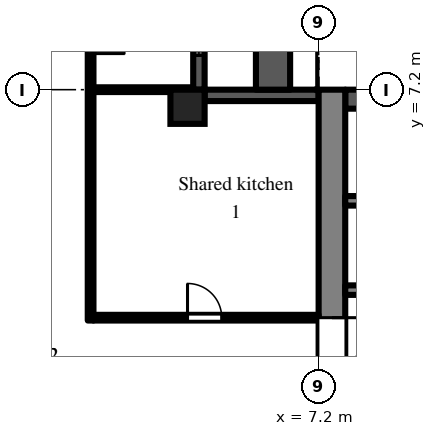
"""IFC4 building model, lengths in metres.
Left out: names, types, materials, properties, quantities, classifications, styles, units other than length and angle.
Written with IfcOpenShell. Run it as: python <this file> out.ifc"""

import sys

from ifc_helpers import new_model, si_unit, direction, frame, frame_2d, origin, origin_2d, place, context, subcontext, project, spatial, rectangle, extrude, element, fill, save


model = new_model("IFC4")
c1 = context("Model", 3, precision=1e-05, world=origin(), true_north=direction((0.0, 1.0)))
c2 = subcontext(c1, "Body", "Model", "MODEL_VIEW")
j1 = project(units=[si_unit("LENGTHUNIT", "METRE"), si_unit("PLANEANGLEUNIT", "RADIAN")], contexts=[c1])
p1 = place(None, origin())
s1 = spatial("IfcSite", under=j1, at=p1, CompositionType="ELEMENT")
p2 = place(p1, origin())
s2 = spatial("IfcBuilding", under=s1, at=p2, CompositionType="ELEMENT")
p3 = place(p2, frame((0.0, 0.0, 69.9)))
s3 = spatial("IfcBuildingStorey", under=s2, at=p3, CompositionType="ELEMENT", Elevation=69.9)
p4 = place(p3, frame((3.75, 6.75, 0.0), z_axis=(0.0, 0.0, 1.0), x_axis=(1.0, 0.0, 0.0)))
e1 = element("IfcColumn", 1, at=p4, inside=s3, PredefinedType="COLUMN", context=c2, shape_type="SweptSolid", body=[
    extrude(rectangle(XDim=0.9, YDim=0.9, at=origin_2d()), origin(), (0.0, 0.0, 1.0), 3.0),
])
p5 = place(p3, frame((7.2, 7.05, 0.0), z_axis=(0.0, 0.0, 1.0), x_axis=(-1.0, 0.0, 0.0)))
e2 = element("IfcWall", 2, at=p5, inside=s3, PredefinedType="SOLIDWALL", context=c2, shape_type="SweptSolid", body=[
    extrude(rectangle(XDim=3.0, YDim=0.3, at=frame_2d((1.5, 0.0))), origin(), (0.0, 0.0, 1.0), 2.1),
])
p6 = place(p3, frame((4.05, 7.2, 0.0), z_axis=(0.0, 0.0, 1.0), x_axis=(0.0, 1.0, 0.0)))
e3 = element("IfcWall", 3, at=p6, inside=s3, PredefinedType="SOLIDWALL", context=c2, shape_type="SweptSolid", body=[
    extrude(rectangle(XDim=7.2, YDim=0.3, at=frame_2d((3.6, 0.0))), origin(), (0.0, 0.0, 1.0), 2.1),
])
p7 = place(p6, frame((3.0, 0.0, 0.0)))
e4 = element("IfcOpeningElement", 4, at=p7, cuts=e3, PredefinedType="OPENING", context=c2, shape_type="SweptSolid", body=[
    extrude(rectangle(XDim=1.2, YDim=2.05, at=frame_2d((0.6, 1.025))), frame((0.0, 0.16, 0.0), z_axis=(0.0, -1.0, 0.0), x_axis=(1.0, 0.0, 0.0)), (0.0, 0.0, 1.0), 0.32),
])
p8 = place(p6, frame((0.9, 0.0, 0.2)))
e5 = element("IfcOpeningElement", 5, at=p8, cuts=e3, PredefinedType="OPENING", context=c2, shape_type="SweptSolid", body=[
    extrude(rectangle(XDim=1.8, YDim=1.85, at=frame_2d((0.9, 0.925))), frame((0.0, 0.16, 0.0), z_axis=(0.0, -1.0, 0.0), x_axis=(1.0, 0.0, 0.0)), (0.0, 0.0, 1.0), 0.32),
])
p9 = place(p6, frame((4.5, 0.0, 0.2)))
e6 = element("IfcOpeningElement", 6, at=p9, cuts=e3, PredefinedType="OPENING", context=c2, shape_type="SweptSolid", body=[
    extrude(rectangle(XDim=1.8, YDim=1.85, at=frame_2d((0.9, 0.925))), frame((0.0, 0.16, 0.0), z_axis=(0.0, -1.0, 0.0), x_axis=(1.0, 0.0, 0.0)), (0.0, 0.0, 1.0), 0.32),
])
p10 = place(p3, frame((6.0, 7.2, 0.0), z_axis=(0.0, 0.0, 1.0), x_axis=(0.0, 1.0, 0.0)))
e7 = element("IfcWall", 7, at=p10, inside=s3, PredefinedType="PARAPET", context=c2, shape_type="SweptSolid", body=[
    extrude(rectangle(XDim=7.2, YDim=0.9, at=frame_2d((3.6, 0.0))), origin(), (0.0, 0.0, 1.0), 0.8),
])
p11 = place(p3, frame((7.55, -7.2, 0.0), z_axis=(0.0, 0.0, 1.0), x_axis=(0.0, 1.0, 0.0)))
e8 = element("IfcWall", 8, at=p11, inside=s3, PredefinedType="SHEAR", context=c2, shape_type="SweptSolid", body=[
    extrude(rectangle(XDim=14.4, YDim=0.7, at=frame_2d((7.2, 0.0))), origin(), (0.0, 0.0, 1.0), 2.575),
])
p12 = place(p11, frame((6.0, 0.0, 0.0)))
e9 = element("IfcOpeningElement", 9, at=p12, cuts=e8, PredefinedType="OPENING", context=c2, shape_type="SweptSolid", body=[
    extrude(rectangle(XDim=2.4, YDim=2.2, at=frame_2d((1.2, 1.1))), frame((0.0, 0.36, 0.0), z_axis=(0.0, -1.0, 0.0), x_axis=(1.0, 0.0, 0.0)), (0.0, 0.0, 1.0), 0.72),
])
p13 = place(p3, frame((7.9, 6.95, 0.0), z_axis=(0.0, 0.0, 1.0), x_axis=(1.0, 0.0, 0.0)))
e10 = element("IfcWall", 10, at=p13, inside=s3, PredefinedType="SHEAR", context=c2, shape_type="SweptSolid", body=[
    extrude(rectangle(XDim=12.95, YDim=0.5, at=frame_2d((6.475, 0.0))), origin(), (0.0, 0.0, 1.0), 2.575),
])
p14 = place(p3, frame((7.9, 1.925, 0.0), z_axis=(0.0, 0.0, 1.0), x_axis=(1.0, 0.0, 0.0)))
e11 = element("IfcWall", 11, at=p14, inside=s3, PredefinedType="SHEAR", context=c2, shape_type="SweptSolid", body=[
    extrude(rectangle(XDim=12.95, YDim=0.25, at=frame_2d((6.475, 0.0))), origin(), (0.0, 0.0, 1.0), 2.575),
])
p15 = place(p14, frame((0.525, 0.0, 0.0)))
e12 = element("IfcOpeningElement", 12, at=p15, cuts=e11, PredefinedType="OPENING", context=c2, shape_type="SweptSolid", body=[
    extrude(rectangle(XDim=0.9, YDim=2.1, at=frame_2d((0.45, 1.05))), frame((0.0, 0.135, 0.0), z_axis=(0.0, -1.0, 0.0), x_axis=(1.0, 0.0, 0.0)), (0.0, 0.0, 1.0), 0.27),
])
p16 = place(p14, frame((2.625, 0.0, 0.0)))
e13 = element("IfcOpeningElement", 13, at=p16, cuts=e11, PredefinedType="OPENING", context=c2, shape_type="SweptSolid", body=[
    extrude(rectangle(XDim=1.1, YDim=2.1, at=frame_2d((0.55, 1.05))), frame((0.0, 0.135, 0.0), z_axis=(0.0, -1.0, 0.0), x_axis=(1.0, 0.0, 0.0)), (0.0, 0.0, 1.0), 0.27),
])
p17 = place(p14, frame((7.125, 0.0, 0.0)))
e14 = element("IfcOpeningElement", 14, at=p17, cuts=e11, PredefinedType="OPENING", context=c2, shape_type="SweptSolid", body=[
    extrude(rectangle(XDim=0.9, YDim=2.1, at=frame_2d((0.45, 1.05))), frame((0.0, 0.135, 0.0), z_axis=(0.0, -1.0, 0.0), x_axis=(1.0, 0.0, 0.0)), (0.0, 0.0, 1.0), 0.27),
])
p18 = place(p3, frame((7.9, 4.275, 0.0), z_axis=(0.0, 0.0, 1.0), x_axis=(1.0, 0.0, 0.0)))
e15 = element("IfcWall", 15, at=p18, inside=s3, PredefinedType="SHEAR", context=c2, shape_type="SweptSolid", body=[
    extrude(rectangle(XDim=1.95, YDim=0.25, at=frame_2d((0.975, 0.0))), origin(), (0.0, 0.0, 1.0), 2.575),
])
p19 = place(p3, frame((1.2, 1.125, 0.0), z_axis=(0.0, 0.0, 1.0), x_axis=(0.0, 1.0, 0.0)))
e16 = element("IfcWall", 16, at=p19, inside=s3, PredefinedType="PARTITIONING", context=c2, shape_type="SweptSolid", body=[
    extrude(rectangle(XDim=16.8, YDim=0.15, at=frame_2d((8.4, 0.0))), origin(), (0.0, 0.0, 1.0), 2.575),
])
p20 = place(p19, frame((7.025, 0.0, 0.0)))
e17 = element("IfcOpeningElement", 17, at=p20, cuts=e16, PredefinedType="OPENING", context=c2, shape_type="SweptSolid", body=[
    extrude(rectangle(XDim=0.9, YDim=2.1, at=frame_2d((0.45, 1.05))), frame((0.0, 0.085, 0.0), z_axis=(0.0, -1.0, 0.0), x_axis=(1.0, 0.0, 0.0)), (0.0, 0.0, 1.0), 0.17),
])
p21 = place(p19, frame((10.625, 0.0, 0.0)))
e18 = element("IfcOpeningElement", 18, at=p21, cuts=e16, PredefinedType="OPENING", context=c2, shape_type="SweptSolid", body=[
    extrude(rectangle(XDim=0.9, YDim=2.1, at=frame_2d((0.45, 1.05))), frame((0.0, 0.085, 0.0), z_axis=(0.0, -1.0, 0.0), x_axis=(1.0, 0.0, 0.0)), (0.0, 0.0, 1.0), 0.17),
])
p22 = place(p19, frame((13.475, 0.0, 0.0)))
e19 = element("IfcOpeningElement", 19, at=p22, cuts=e16, PredefinedType="OPENING", context=c2, shape_type="SweptSolid", body=[
    extrude(rectangle(XDim=1.0, YDim=2.1, at=frame_2d((0.5, 1.05))), frame((0.0, 0.085, 0.0), z_axis=(0.0, -1.0, 0.0), x_axis=(1.0, 0.0, 0.0)), (0.0, 0.0, 1.0), 0.17),
])
p23 = place(p3, frame((1.275, 1.2, 0.0), z_axis=(0.0, 0.0, 1.0), x_axis=(1.0, 0.0, 0.0)))
e20 = element("IfcWall", 20, at=p23, inside=s3, PredefinedType="PARTITIONING", context=c2, shape_type="SweptSolid", body=[
    extrude(rectangle(XDim=5.925, YDim=0.15, at=frame_2d((2.962, 0.0))), origin(), (0.0, 0.0, 1.0), 2.575),
])
p24 = place(p23, frame((2.475, 0.0, 0.0)))
e21 = element("IfcOpeningElement", 21, at=p24, cuts=e20, PredefinedType="OPENING", context=c2, shape_type="SweptSolid", body=[
    extrude(rectangle(XDim=0.9, YDim=2.1, at=frame_2d((0.45, 1.05))), frame((0.0, 0.085, 0.0), z_axis=(0.0, -1.0, 0.0), x_axis=(1.0, 0.0, 0.0)), (0.0, 0.0, 1.0), 0.17),
])
p25 = place(p3, frame((1.275, 7.2, 0.0), z_axis=(0.0, 0.0, 1.0), x_axis=(1.0, 0.0, 0.0)))
e22 = element("IfcWall", 22, at=p25, inside=s3, PredefinedType="PARTITIONING", context=c2, shape_type="SweptSolid", body=[
    extrude(rectangle(XDim=2.625, YDim=0.125, at=frame_2d((1.312, 0.0))), origin(), (0.0, 0.0, 1.0), 2.575),
])
p26 = place(p8, origin())
e23 = element("IfcWindow", 23, at=p26, inside=s3, PartitioningType="SINGLE_PANEL", PredefinedType="WINDOW", context=c2, shape_type="SweptSolid", body=[
    extrude(rectangle(XDim=1.8, YDim=1.85, at=frame_2d((0.9, 0.925))), frame((0.0, 0.03, 0.0), z_axis=(0.0, -1.0, 0.0), x_axis=(1.0, 0.0, 0.0)), (0.0, 0.0, 1.0), 0.06),
])
fill(e5, e23)
p27 = place(p12, frame((2.4, 0.0, 0.0), z_axis=(0.0, 0.0, 1.0), x_axis=(-1.0, 0.0, 0.0)))
e24 = element("IfcDoor", 24, at=p27, inside=s3, OperationType="DOUBLE_DOOR_DOUBLE_SWING", PredefinedType="DOOR", context=c2, shape_type="SweptSolid", body=[
    extrude(rectangle(XDim=2.4, YDim=2.2, at=frame_2d((1.2, 1.1))), frame((0.0, 0.025, 0.0), z_axis=(0.0, -1.0, 0.0), x_axis=(1.0, 0.0, 0.0)), (0.0, 0.0, 1.0), 0.05),
])
fill(e9, e24)
p28 = place(p24, origin())
e25 = element("IfcDoor", 25, at=p28, inside=s3, OperationType="SINGLE_SWING_LEFT", PredefinedType="DOOR", context=c2, shape_type="SweptSolid", body=[
    extrude(rectangle(XDim=0.9, YDim=2.1, at=frame_2d((0.45, 1.05))), frame((0.0, 0.025, 0.0), z_axis=(0.0, -1.0, 0.0), x_axis=(1.0, 0.0, 0.0)), (0.0, 0.0, 1.0), 0.05),
])
fill(e21, e25)
p29 = place(p20, frame((0.9, 0.0, 0.0), z_axis=(0.0, 0.0, 1.0), x_axis=(-1.0, 0.0, 0.0)))
e26 = element("IfcDoor", 26, at=p29, inside=s3, OperationType="SINGLE_SWING_RIGHT", PredefinedType="DOOR", context=c2, shape_type="SweptSolid", body=[
    extrude(rectangle(XDim=0.9, YDim=2.1, at=frame_2d((0.45, 1.05))), frame((0.0, 0.025, 0.0), z_axis=(0.0, -1.0, 0.0), x_axis=(1.0, 0.0, 0.0)), (0.0, 0.0, 1.0), 0.05),
])
fill(e17, e26)
save(model, sys.argv[1])
